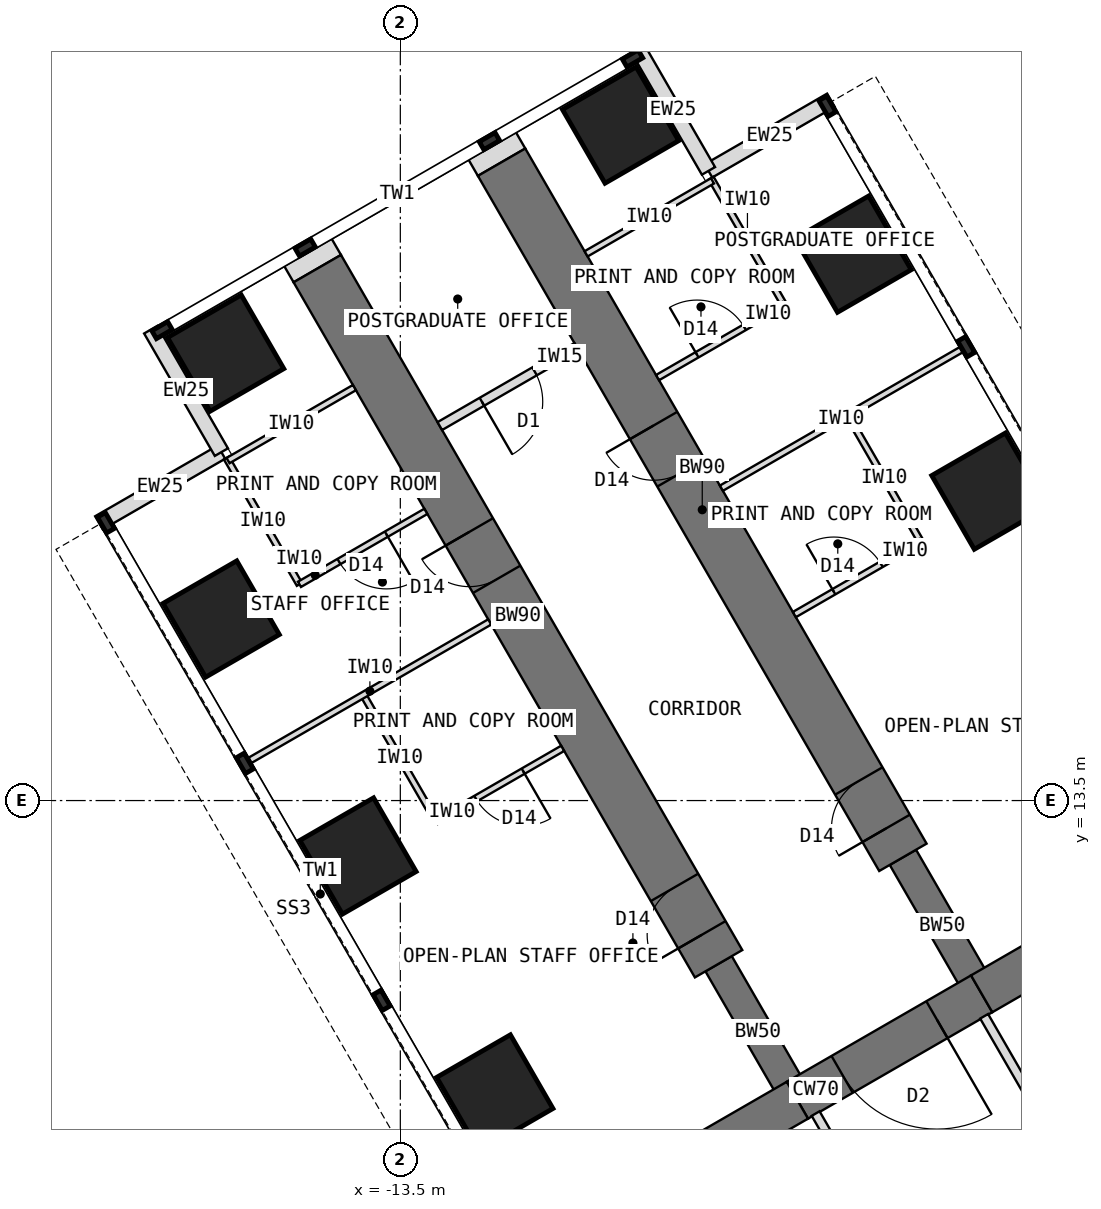
"""IFC4 building model, lengths in metres.
Left out: names, types, materials, properties, quantities, classifications, styles, units other than length and angle.
Written with IfcOpenShell. Run it as: python <this file> out.ifc"""

import sys

from ifc_helpers import new_model, si_unit, direction, frame, frame_2d, origin, origin_2d, place, context, subcontext, project, spatial, rectangle, extrude, element, fill, save


model = new_model("IFC4")
c1 = context("Model", 3, precision=1e-05, world=origin(), true_north=direction((0.0, 1.0)))
c2 = subcontext(c1, "Body", "Model", "MODEL_VIEW")
j1 = project(units=[si_unit("LENGTHUNIT", "METRE"), si_unit("PLANEANGLEUNIT", "RADIAN")], contexts=[c1])
p1 = place(None, origin())
s1 = spatial("IfcSite", under=j1, at=p1, CompositionType="ELEMENT")
p2 = place(p1, origin())
s2 = spatial("IfcBuilding", under=s1, at=p2, CompositionType="ELEMENT")
p3 = place(p2, frame((0.0, 0.0, 80.5)))
s3 = spatial("IfcBuildingStorey", under=s2, at=p3, CompositionType="ELEMENT", Elevation=80.5)
p4 = place(p3, frame((0.0, 12.596, 0.0), z_axis=(0.0, 0.0, 1.0), x_axis=(-0.866011268655, -0.500024481964, 0.0)))
e1 = element("IfcWall", 1, at=p4, inside=s3, PredefinedType="SHEAR", context=c2, shape_type="SweptSolid", body=[
    extrude(rectangle(XDim=4.548, YDim=0.7, at=frame_2d((2.274, 0.0))), origin(), (0.0, 0.0, 1.0), 4.0),
])
p5 = place(p3, frame((-3.939, 10.322, 0.0), z_axis=(0.0, 0.0, 1.0), x_axis=(-0.866019471182, -0.500010275428, 0.0)))
e2 = element("IfcWall", 2, at=p5, inside=s3, PredefinedType="SHEAR", context=c2, shape_type="SweptSolid", body=[
    extrude(rectangle(XDim=3.5, YDim=0.7, at=frame_2d((1.75, 0.0))), origin(), (0.0, 0.0, 1.0), 4.0),
])
p6 = place(p5, frame((0.85, 0.0, 0.0)))
e3 = element("IfcOpeningElement", 3, at=p6, cuts=e2, PredefinedType="OPENING", context=c2, shape_type="SweptSolid", body=[
    extrude(rectangle(XDim=1.8, YDim=2.1, at=frame_2d((0.9, 1.05))), frame((0.0, 0.36, 0.0), z_axis=(0.0, -1.0, 0.0), x_axis=(1.0, 0.0, 0.0)), (0.0, 0.0, 1.0), 0.72),
])
p7 = place(p3, frame((-6.97, 8.572, 0.0), z_axis=(0.0, 0.0, 1.0), x_axis=(-0.866034513004, -0.499984222037, 0.0)))
e4 = element("IfcWall", 4, at=p7, inside=s3, PredefinedType="SHEAR", context=c2, shape_type="SweptSolid", body=[
    extrude(rectangle(XDim=4.548, YDim=0.7, at=frame_2d((2.274, 0.0))), origin(), (0.0, 0.0, 1.0), 4.0),
])
p8 = place(p3, frame((-6.97, 8.572, 0.0), z_axis=(0.0, 0.0, 1.0), x_axis=(-0.499988811324, 0.866031863473, 0.0)))
e5 = element("IfcWall", 5, at=p8, inside=s3, PredefinedType="SHEAR", context=c2, shape_type="SweptSolid", body=[
    extrude(rectangle(XDim=2.592, YDim=0.5, at=frame_2d((1.296, 0.0))), origin(), (0.0, 0.0, 1.0), 4.0),
])
p9 = place(p3, frame((-8.266, 10.816, 0.0), z_axis=(0.0, 0.0, 1.0), x_axis=(-0.499996231654, 0.866027579429, 0.0)))
e6 = element("IfcWall", 6, at=p9, inside=s3, PredefinedType="SHEAR", context=c2, shape_type="SweptSolid", body=[
    extrude(rectangle(XDim=13.2, YDim=0.9, at=frame_2d((6.6, 0.0))), origin(), (0.0, 0.0, 1.0), 4.0),
])
p10 = place(p9, frame((0.55, 0.0, 0.0)))
e7 = element("IfcOpeningElement", 7, at=p10, cuts=e6, PredefinedType="OPENING", context=c2, shape_type="SweptSolid", body=[
    extrude(rectangle(XDim=0.9, YDim=2.1, at=frame_2d((0.45, 1.05))), frame((0.0, 0.46, 0.0), z_axis=(0.0, -1.0, 0.0), x_axis=(1.0, 0.0, 0.0)), (0.0, 0.0, 1.0), 0.92),
])
p11 = place(p9, frame((7.3, 0.0, 0.0)))
e8 = element("IfcOpeningElement", 8, at=p11, cuts=e6, PredefinedType="OPENING", context=c2, shape_type="SweptSolid", body=[
    extrude(rectangle(XDim=0.9, YDim=2.1, at=frame_2d((0.45, 1.05))), frame((0.0, 0.46, 0.0), z_axis=(0.0, -1.0, 0.0), x_axis=(1.0, 0.0, 0.0)), (0.0, 0.0, 1.0), 0.92),
])
p12 = place(p3, frame((-3.939, 10.322, 0.0), z_axis=(0.0, 0.0, 1.0), x_axis=(-0.499918158782, 0.866072649678, 0.0)))
e9 = element("IfcWall", 9, at=p12, inside=s3, PredefinedType="SHEAR", context=c2, shape_type="SweptSolid", body=[
    extrude(rectangle(XDim=2.592, YDim=0.5, at=frame_2d((1.296, 0.0))), origin(), (0.0, 0.0, 1.0), 4.0),
])
p13 = place(p3, frame((-5.234, 12.566, 0.0), z_axis=(0.0, 0.0, 1.0), x_axis=(-0.500010103361, 0.866019570528, 0.0)))
e10 = element("IfcWall", 10, at=p13, inside=s3, PredefinedType="SHEAR", context=c2, shape_type="SweptSolid", body=[
    extrude(rectangle(XDim=13.2, YDim=0.9, at=frame_2d((6.6, 0.0))), origin(), (0.0, 0.0, 1.0), 4.0),
])
p14 = place(p13, frame((0.55, 0.0, 0.0)))
e11 = element("IfcOpeningElement", 11, at=p14, cuts=e10, PredefinedType="OPENING", context=c2, shape_type="SweptSolid", body=[
    extrude(rectangle(XDim=0.9, YDim=2.1, at=frame_2d((0.45, 1.05))), frame((0.0, 0.46, 0.0), z_axis=(0.0, -1.0, 0.0), x_axis=(1.0, 0.0, 0.0)), (0.0, 0.0, 1.0), 0.92),
])
p15 = place(p13, frame((7.3, 0.0, 0.0)))
e12 = element("IfcOpeningElement", 12, at=p15, cuts=e10, PredefinedType="OPENING", context=c2, shape_type="SweptSolid", body=[
    extrude(rectangle(XDim=0.9, YDim=2.1, at=frame_2d((0.45, 1.05))), frame((0.0, 0.46, 0.0), z_axis=(0.0, -1.0, 0.0), x_axis=(1.0, 0.0, 0.0)), (0.0, 0.0, 1.0), 0.92),
])
for number, where, z_axis, x_axis in (
    (13, (-11.946, 8.691, 0.0), (0.0, 0.0, 1.0), (0.866, 0.5, 0.0)),
    (14, (-14.196, 12.588, 0.0), (0.0, 0.0, 1.0), (0.866, 0.5, 0.0)),
    (15, (-3.804, 18.588, 0.0), (0.0, 0.0, 1.0), (0.866, 0.5, 0.0)),
    (16, (-16.446, 16.486, 0.0), (0.0, 0.0, 1.0), (0.866, 0.5, 0.0)),
    (17, (-6.054, 22.486, 0.0), (0.0, 0.0, 1.0), (0.866, 0.5, 0.0)),
    (18, (-16.373, 20.858, 0.0), (0.0, 0.0, 1.0), (0.866, 0.5, 0.0)),
    (19, (-9.877, 24.608, 0.0), (0.0, 0.0, 1.0), (0.866, 0.5, 0.0)),
):
    element("IfcColumn", number, at=place(p3, frame(where, z_axis=z_axis, x_axis=x_axis)), inside=s3, PredefinedType="COLUMN", context=c2, shape_type="SweptSolid", body=[
        extrude(rectangle(XDim=1.4, YDim=1.4, at=origin_2d()), origin(), (0.0, 0.0, 1.0), 4.0),
    ])
for number, where, z_axis, x_axis in (
    (20, (-18.456, 18.067, 0.0), (0.0, 0.0, 1.0), (0.866, 0.5, 0.0)),
    (21, (-16.443, 19.23, 0.0), (0.0, 0.0, 1.0), (-0.5, 0.866, 0.0)),
    (22, (-6.419, 25.017, 0.0), (0.0, 0.0, 1.0), (-0.866, -0.5, 0.0)),
    (23, (-8.432, 23.855, 0.0), (0.0, 0.0, 1.0), (-0.5, 0.866, 0.0)),
):
    element("IfcWall", number, at=place(p3, frame(where, z_axis=z_axis, x_axis=x_axis)), inside=s3, PredefinedType="STANDARD", context=c2, shape_type="SweptSolid", body=[
        extrude(rectangle(XDim=2.325, YDim=0.25, at=frame_2d((1.163, 0.0))), origin(), (0.0, 0.0, 1.0), 3.8),
    ])
for number, where, z_axis, x_axis in (
    (24, (-14.865, 22.248, 0.0), (0.0, 0.0, 1.0), (-0.5, 0.866, 0.0)),
    (25, (-11.834, 23.998, 0.0), (0.0, 0.0, 1.0), (-0.5, 0.866, 0.0)),
):
    element("IfcWall", number, at=place(p3, frame(where, z_axis=z_axis, x_axis=x_axis)), inside=s3, PredefinedType="PARTITIONING", context=c2, shape_type="SweptSolid", body=[
        extrude(rectangle(XDim=0.31, YDim=0.9, at=frame_2d((0.155, 0.0))), origin(), (0.0, 0.0, 1.0), 3.8),
    ])
p16 = place(p3, frame((-12.03, 16.437, 0.0), z_axis=(0.0, 0.0, 1.0), x_axis=(-0.866035472144, -0.499982560684, 0.0)))
e26 = element("IfcWall", 26, at=p16, inside=s3, PredefinedType="PARTITIONING", context=c2, shape_type="SweptSolid", body=[
    extrude(rectangle(XDim=4.55, YDim=0.1, at=frame_2d((2.275, 0.0))), origin(), (0.0, 0.0, 1.0), 3.8),
])
p17 = place(p3, frame((-12.909, 13.158, 0.0), z_axis=(0.0, 0.0, 1.0), x_axis=(-0.499957262057, 0.866050077142, 0.0)))
e27 = element("IfcWall", 27, at=p17, inside=s3, PredefinedType="PARTITIONING", context=c2, shape_type="SweptSolid", body=[
    extrude(rectangle(XDim=2.4, YDim=0.1, at=frame_2d((1.2, 0.0))), origin(), (0.0, 0.0, 1.0), 3.8),
])
p18 = place(p3, frame((-10.83, 14.359, 0.0), z_axis=(0.0, 0.0, 1.0), x_axis=(-0.865980596518, -0.500077600433, 0.0)))
e28 = element("IfcWall", 28, at=p18, inside=s3, PredefinedType="PARTITIONING", context=c2, shape_type="SweptSolid", body=[
    extrude(rectangle(XDim=2.4, YDim=0.1, at=frame_2d((1.2, 0.0))), origin(), (0.0, 0.0, 1.0), 3.8),
])
p19 = place(p18, frame((0.75, 0.0, 0.0)))
e29 = element("IfcOpeningElement", 29, at=p19, cuts=e28, PredefinedType="OPENING", context=c2, shape_type="SweptSolid", body=[
    extrude(rectangle(XDim=0.9, YDim=2.1, at=frame_2d((0.45, 1.05))), frame((0.0, 0.06, 0.0), z_axis=(0.0, -1.0, 0.0), x_axis=(1.0, 0.0, 0.0)), (0.0, 0.0, 1.0), 0.12),
])
p20 = place(p3, frame((-15.159, 17.056, 0.0), z_axis=(0.0, 0.0, 1.0), x_axis=(-0.500001309137, 0.866024647952, 0.0)))
e30 = element("IfcWall", 30, at=p20, inside=s3, PredefinedType="PARTITIONING", context=c2, shape_type="SweptSolid", body=[
    extrude(rectangle(XDim=2.4, YDim=0.1, at=frame_2d((1.2, 0.0))), origin(), (0.0, 0.0, 1.0), 3.8),
])
p21 = place(p3, frame((-13.08, 18.256, 0.0), z_axis=(0.0, 0.0, 1.0), x_axis=(-0.866024647952, -0.500001309137, 0.0)))
e31 = element("IfcWall", 31, at=p21, inside=s3, PredefinedType="PARTITIONING", context=c2, shape_type="SweptSolid", body=[
    extrude(rectangle(XDim=2.4, YDim=0.1, at=frame_2d((1.2, 0.0))), origin(), (0.0, 0.0, 1.0), 3.8),
])
p22 = place(p21, frame((0.75, 0.0, 0.0)))
e32 = element("IfcOpeningElement", 32, at=p22, cuts=e31, PredefinedType="OPENING", context=c2, shape_type="SweptSolid", body=[
    extrude(rectangle(XDim=0.9, YDim=2.1, at=frame_2d((0.45, 1.05))), frame((0.0, 0.06, 0.0), z_axis=(0.0, -1.0, 0.0), x_axis=(1.0, 0.0, 0.0)), (0.0, 0.0, 1.0), 0.12),
])
p23 = place(p3, frame((-14.255, 20.291, 0.0), z_axis=(0.0, 0.0, 1.0), x_axis=(-0.866024647952, -0.500001309137, 0.0)))
e33 = element("IfcWall", 33, at=p23, inside=s3, PredefinedType="PARTITIONING", context=c2, shape_type="SweptSolid", body=[
    extrude(rectangle(XDim=2.4, YDim=0.1, at=frame_2d((1.2, 0.0))), origin(), (0.0, 0.0, 1.0), 3.8),
])
p24 = place(p3, frame((-8.22, 18.637, 0.0), z_axis=(0.0, 0.0, 1.0), x_axis=(0.866012237902, 0.500022803284, 0.0)))
e34 = element("IfcWall", 34, at=p24, inside=s3, PredefinedType="PARTITIONING", context=c2, shape_type="SweptSolid", body=[
    extrude(rectangle(XDim=4.55, YDim=0.1, at=frame_2d((2.275, 0.0))), origin(), (0.0, 0.0, 1.0), 3.8),
])
p25 = place(p3, frame((-4.941, 17.759, 0.0), z_axis=(0.0, 0.0, 1.0), x_axis=(-0.500077600433, 0.865980596518, 0.0)))
e35 = element("IfcWall", 35, at=p25, inside=s3, PredefinedType="PARTITIONING", context=c2, shape_type="SweptSolid", body=[
    extrude(rectangle(XDim=2.4, YDim=0.1, at=frame_2d((1.2, 0.0))), origin(), (0.0, 0.0, 1.0), 3.8),
])
p26 = place(p3, frame((-7.02, 16.559, 0.0), z_axis=(0.0, 0.0, 1.0), x_axis=(0.866050077142, 0.499957262057, 0.0)))
e36 = element("IfcWall", 36, at=p26, inside=s3, PredefinedType="PARTITIONING", context=c2, shape_type="SweptSolid", body=[
    extrude(rectangle(XDim=2.4, YDim=0.1, at=frame_2d((1.2, 0.0))), origin(), (0.0, 0.0, 1.0), 3.8),
])
p27 = place(p26, frame((0.75, 0.0, 0.0)))
e37 = element("IfcOpeningElement", 37, at=p27, cuts=e36, PredefinedType="OPENING", context=c2, shape_type="SweptSolid", body=[
    extrude(rectangle(XDim=0.9, YDim=2.1, at=frame_2d((0.45, 1.05))), frame((0.0, 0.06, 0.0), z_axis=(0.0, -1.0, 0.0), x_axis=(1.0, 0.0, 0.0)), (0.0, 0.0, 1.0), 0.12),
])
p28 = place(p3, frame((-7.191, 21.656, 0.0), z_axis=(0.0, 0.0, 1.0), x_axis=(-0.500077600433, 0.865980596518, 0.0)))
e38 = element("IfcWall", 38, at=p28, inside=s3, PredefinedType="PARTITIONING", context=c2, shape_type="SweptSolid", body=[
    extrude(rectangle(XDim=2.4, YDim=0.1, at=frame_2d((1.2, 0.0))), origin(), (0.0, 0.0, 1.0), 3.8),
])
p29 = place(p3, frame((-9.27, 20.456, 0.0), z_axis=(0.0, 0.0, 1.0), x_axis=(0.866006032174, 0.500033551112, 0.0)))
e39 = element("IfcWall", 39, at=p29, inside=s3, PredefinedType="PARTITIONING", context=c2, shape_type="SweptSolid", body=[
    extrude(rectangle(XDim=2.4, YDim=0.1, at=frame_2d((1.2, 0.0))), origin(), (0.0, 0.0, 1.0), 3.8),
])
p30 = place(p29, frame((0.75, 0.0, 0.0)))
e40 = element("IfcOpeningElement", 40, at=p30, cuts=e39, PredefinedType="OPENING", context=c2, shape_type="SweptSolid", body=[
    extrude(rectangle(XDim=0.9, YDim=2.1, at=frame_2d((0.45, 1.05))), frame((0.0, 0.06, 0.0), z_axis=(0.0, -1.0, 0.0), x_axis=(1.0, 0.0, 0.0)), (0.0, 0.0, 1.0), 0.12),
])
p31 = place(p3, frame((-10.445, 22.491, 0.0), z_axis=(0.0, 0.0, 1.0), x_axis=(0.866006032174, 0.500033551112, 0.0)))
e41 = element("IfcWall", 41, at=p31, inside=s3, PredefinedType="PARTITIONING", context=c2, shape_type="SweptSolid", body=[
    extrude(rectangle(XDim=2.4, YDim=0.1, at=frame_2d((1.2, 0.0))), origin(), (0.0, 0.0, 1.0), 3.8),
])
p32 = place(p3, frame((-4.436, 4.483, 0.0), z_axis=(0.0, 0.0, 1.0), x_axis=(-0.500017246033, 0.866015446554, 0.0)))
e42 = element("IfcWall", 42, at=p32, inside=s3, PredefinedType="PARTITIONING", context=c2, shape_type="SweptSolid", body=[
    extrude(rectangle(XDim=4.469, YDim=0.15, at=frame_2d((2.234, 0.0))), origin(), (0.0, 0.0, 1.0), 3.8),
])
p33 = place(p32, frame((1.744, 0.0, 0.0)))
e43 = element("IfcOpeningElement", 43, at=p33, cuts=e42, PredefinedType="OPENING", context=c2, shape_type="SweptSolid", body=[
    extrude(rectangle(XDim=1.0, YDim=2.1, at=frame_2d((0.5, 1.05))), frame((0.0, 0.085, 0.0), z_axis=(0.0, -1.0, 0.0), x_axis=(1.0, 0.0, 0.0)), (0.0, 0.0, 1.0), 0.17),
])
p34 = place(p3, frame((-3.898, 9.952, 0.0), z_axis=(0.0, 0.0, 1.0), x_axis=(0.499999927604, -0.866025445582, 0.0)))
e44 = element("IfcWall", 44, at=p34, inside=s3, PredefinedType="PARTITIONING", context=c2, shape_type="SweptSolid", body=[
    extrude(rectangle(XDim=4.468, YDim=0.15, at=frame_2d((2.234, 0.0))), origin(), (0.0, 0.0, 1.0), 3.8),
])
p35 = place(p34, frame((1.724, 0.0, 0.0)))
e45 = element("IfcOpeningElement", 45, at=p35, cuts=e44, PredefinedType="OPENING", context=c2, shape_type="SweptSolid", body=[
    extrude(rectangle(XDim=1.0, YDim=2.1, at=frame_2d((0.5, 1.05))), frame((0.0, 0.085, 0.0), z_axis=(0.0, -1.0, 0.0), x_axis=(1.0, 0.0, 0.0)), (0.0, 0.0, 1.0), 0.17),
])
p36 = place(p3, frame((-10.599, 20.958, 0.0), z_axis=(0.0, 0.0, 1.0), x_axis=(-0.866021400173, -0.500006934395, 0.0)))
e46 = element("IfcWall", 46, at=p36, inside=s3, PredefinedType="PARTITIONING", context=c2, shape_type="SweptSolid", body=[
    extrude(rectangle(XDim=2.6, YDim=0.15, at=frame_2d((1.3, 0.0))), origin(), (0.0, 0.0, 1.0), 3.8),
])
p37 = place(p36, frame((0.8, 0.0, 0.0)))
e47 = element("IfcOpeningElement", 47, at=p37, cuts=e46, PredefinedType="OPENING", context=c2, shape_type="SweptSolid", body=[
    extrude(rectangle(XDim=1.0, YDim=2.1, at=frame_2d((0.5, 1.05))), frame((0.0, 0.085, 0.0), z_axis=(0.0, -1.0, 0.0), x_axis=(1.0, 0.0, 0.0)), (0.0, 0.0, 1.0), 0.17),
])
p38 = place(p6, origin())
e48 = element("IfcDoor", 48, at=p38, inside=s3, OperationType="DOUBLE_DOOR_DOUBLE_SWING", PredefinedType="DOOR", context=c2, shape_type="SweptSolid", body=[
    extrude(rectangle(XDim=1.72, YDim=2.06, at=frame_2d((0.9, 1.03))), frame((0.0, 0.025, 0.0), z_axis=(0.0, -1.0, 0.0), x_axis=(1.0, 0.0, 0.0)), (0.0, 0.0, 1.0), 0.05),
    extrude(rectangle(XDim=0.04, YDim=2.1, at=frame_2d((0.02, 1.05))), frame((0.0, 0.35, 0.0), z_axis=(0.0, -1.0, 0.0), x_axis=(1.0, 0.0, 0.0)), (0.0, 0.0, 1.0), 0.699),
    extrude(rectangle(XDim=0.04, YDim=2.1, at=frame_2d((1.78, 1.05))), frame((0.0, 0.35, 0.0), z_axis=(0.0, -1.0, 0.0), x_axis=(1.0, 0.0, 0.0)), (0.0, 0.0, 1.0), 0.699),
    extrude(rectangle(XDim=1.72, YDim=0.04, at=frame_2d((0.9, 2.08))), frame((0.0, 0.35, 0.0), z_axis=(0.0, -1.0, 0.0), x_axis=(1.0, 0.0, 0.0)), (0.0, 0.0, 1.0), 0.699),
])
fill(e3, e48)
p39 = place(p19, origin())
e49 = element("IfcDoor", 49, at=p39, inside=s3, OperationType="SINGLE_SWING_LEFT", PredefinedType="DOOR", context=c2, shape_type="SweptSolid", body=[
    extrude(rectangle(XDim=0.9, YDim=2.1, at=frame_2d((0.45, 1.05))), frame((0.0, 0.025, 0.0), z_axis=(0.0, -1.0, 0.0), x_axis=(1.0, 0.0, 0.0)), (0.0, 0.0, 1.0), 0.05),
])
fill(e29, e49)
p40 = place(p22, origin())
e50 = element("IfcDoor", 50, at=p40, inside=s3, OperationType="SINGLE_SWING_LEFT", PredefinedType="DOOR", context=c2, shape_type="SweptSolid", body=[
    extrude(rectangle(XDim=0.9, YDim=2.1, at=frame_2d((0.45, 1.05))), frame((0.0, 0.025, 0.0), z_axis=(0.0, -1.0, 0.0), x_axis=(1.0, 0.0, 0.0)), (0.0, 0.0, 1.0), 0.05),
])
fill(e32, e50)
p41 = place(p27, origin())
e51 = element("IfcDoor", 51, at=p41, inside=s3, OperationType="SINGLE_SWING_LEFT", PredefinedType="DOOR", context=c2, shape_type="SweptSolid", body=[
    extrude(rectangle(XDim=0.9, YDim=2.1, at=frame_2d((0.45, 1.05))), frame((0.0, 0.025, 0.0), z_axis=(0.0, -1.0, 0.0), x_axis=(1.0, 0.0, 0.0)), (0.0, 0.0, 1.0), 0.05),
])
fill(e37, e51)
p42 = place(p30, origin())
e52 = element("IfcDoor", 52, at=p42, inside=s3, OperationType="SINGLE_SWING_LEFT", PredefinedType="DOOR", context=c2, shape_type="SweptSolid", body=[
    extrude(rectangle(XDim=0.9, YDim=2.1, at=frame_2d((0.45, 1.05))), frame((0.0, 0.025, 0.0), z_axis=(0.0, -1.0, 0.0), x_axis=(1.0, 0.0, 0.0)), (0.0, 0.0, 1.0), 0.05),
])
fill(e40, e52)
p43 = place(p37, origin())
e53 = element("IfcDoor", 53, at=p43, inside=s3, OperationType="SINGLE_SWING_RIGHT", PredefinedType="DOOR", context=c2, shape_type="SweptSolid", body=[
    extrude(rectangle(XDim=1.0, YDim=2.1, at=frame_2d((0.5, 1.05))), frame((0.0, 0.025, 0.0), z_axis=(0.0, -1.0, 0.0), x_axis=(1.0, 0.0, 0.0)), (0.0, 0.0, 1.0), 0.05),
])
fill(e47, e53)
p44 = place(p10, origin())
e54 = element("IfcDoor", 54, at=p44, inside=s3, OperationType="SINGLE_SWING_LEFT", PredefinedType="DOOR", context=c2, shape_type="SweptSolid", body=[
    extrude(rectangle(XDim=0.82, YDim=2.06, at=frame_2d((0.45, 1.03))), frame((0.0, 0.025, 0.0), z_axis=(0.0, -1.0, 0.0), x_axis=(1.0, 0.0, 0.0)), (0.0, 0.0, 1.0), 0.05),
    extrude(rectangle(XDim=0.04, YDim=2.1, at=frame_2d((0.02, 1.05))), frame((0.0, 0.45, 0.0), z_axis=(0.0, -1.0, 0.0), x_axis=(1.0, 0.0, 0.0)), (0.0, 0.0, 1.0), 0.899),
    extrude(rectangle(XDim=0.04, YDim=2.1, at=frame_2d((0.88, 1.05))), frame((0.0, 0.45, 0.0), z_axis=(0.0, -1.0, 0.0), x_axis=(1.0, 0.0, 0.0)), (0.0, 0.0, 1.0), 0.899),
    extrude(rectangle(XDim=0.82, YDim=0.04, at=frame_2d((0.45, 2.08))), frame((0.0, 0.45, 0.0), z_axis=(0.0, -1.0, 0.0), x_axis=(1.0, 0.0, 0.0)), (0.0, 0.0, 1.0), 0.899),
])
fill(e7, e54)
p45 = place(p11, origin())
e55 = element("IfcDoor", 55, at=p45, inside=s3, OperationType="SINGLE_SWING_RIGHT", PredefinedType="DOOR", context=c2, shape_type="SweptSolid", body=[
    extrude(rectangle(XDim=0.82, YDim=2.06, at=frame_2d((0.45, 1.03))), frame((0.0, 0.025, 0.0), z_axis=(0.0, -1.0, 0.0), x_axis=(1.0, 0.0, 0.0)), (0.0, 0.0, 1.0), 0.05),
    extrude(rectangle(XDim=0.04, YDim=2.1, at=frame_2d((0.02, 1.05))), frame((0.0, 0.45, 0.0), z_axis=(0.0, -1.0, 0.0), x_axis=(1.0, 0.0, 0.0)), (0.0, 0.0, 1.0), 0.899),
    extrude(rectangle(XDim=0.04, YDim=2.1, at=frame_2d((0.88, 1.05))), frame((0.0, 0.45, 0.0), z_axis=(0.0, -1.0, 0.0), x_axis=(1.0, 0.0, 0.0)), (0.0, 0.0, 1.0), 0.899),
    extrude(rectangle(XDim=0.82, YDim=0.04, at=frame_2d((0.45, 2.08))), frame((0.0, 0.45, 0.0), z_axis=(0.0, -1.0, 0.0), x_axis=(1.0, 0.0, 0.0)), (0.0, 0.0, 1.0), 0.899),
])
fill(e8, e55)
p46 = place(p14, origin())
e56 = element("IfcDoor", 56, at=p46, inside=s3, OperationType="SINGLE_SWING_LEFT", PredefinedType="DOOR", context=c2, shape_type="SweptSolid", body=[
    extrude(rectangle(XDim=0.82, YDim=2.06, at=frame_2d((0.45, 1.03))), frame((0.0, 0.025, 0.0), z_axis=(0.0, -1.0, 0.0), x_axis=(1.0, 0.0, 0.0)), (0.0, 0.0, 1.0), 0.05),
    extrude(rectangle(XDim=0.04, YDim=2.1, at=frame_2d((0.02, 1.05))), frame((0.0, 0.45, 0.0), z_axis=(0.0, -1.0, 0.0), x_axis=(1.0, 0.0, 0.0)), (0.0, 0.0, 1.0), 0.899),
    extrude(rectangle(XDim=0.04, YDim=2.1, at=frame_2d((0.88, 1.05))), frame((0.0, 0.45, 0.0), z_axis=(0.0, -1.0, 0.0), x_axis=(1.0, 0.0, 0.0)), (0.0, 0.0, 1.0), 0.899),
    extrude(rectangle(XDim=0.82, YDim=0.04, at=frame_2d((0.45, 2.08))), frame((0.0, 0.45, 0.0), z_axis=(0.0, -1.0, 0.0), x_axis=(1.0, 0.0, 0.0)), (0.0, 0.0, 1.0), 0.899),
])
fill(e11, e56)
p47 = place(p15, origin())
e57 = element("IfcDoor", 57, at=p47, inside=s3, OperationType="SINGLE_SWING_RIGHT", PredefinedType="DOOR", context=c2, shape_type="SweptSolid", body=[
    extrude(rectangle(XDim=0.82, YDim=2.06, at=frame_2d((0.45, 1.03))), frame((0.0, 0.025, 0.0), z_axis=(0.0, -1.0, 0.0), x_axis=(1.0, 0.0, 0.0)), (0.0, 0.0, 1.0), 0.05),
    extrude(rectangle(XDim=0.04, YDim=2.1, at=frame_2d((0.02, 1.05))), frame((0.0, 0.45, 0.0), z_axis=(0.0, -1.0, 0.0), x_axis=(1.0, 0.0, 0.0)), (0.0, 0.0, 1.0), 0.899),
    extrude(rectangle(XDim=0.04, YDim=2.1, at=frame_2d((0.88, 1.05))), frame((0.0, 0.45, 0.0), z_axis=(0.0, -1.0, 0.0), x_axis=(1.0, 0.0, 0.0)), (0.0, 0.0, 1.0), 0.899),
    extrude(rectangle(XDim=0.82, YDim=0.04, at=frame_2d((0.45, 2.08))), frame((0.0, 0.45, 0.0), z_axis=(0.0, -1.0, 0.0), x_axis=(1.0, 0.0, 0.0)), (0.0, 0.0, 1.0), 0.899),
])
fill(e12, e57)
save(model, sys.argv[1])
